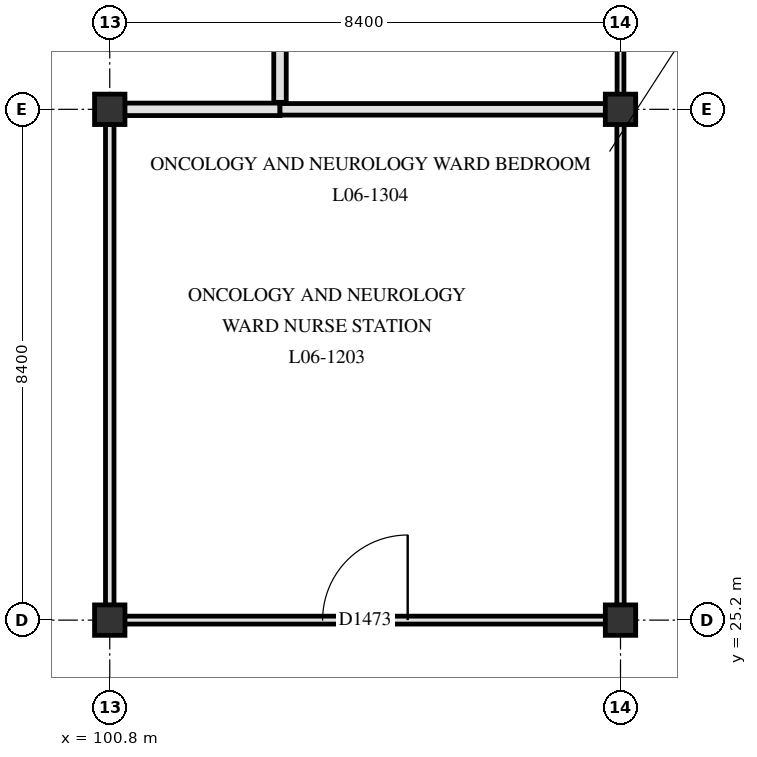
"""IFC4 building model, lengths in metres.
Left out: names, types, materials, properties, quantities, classifications, styles, units other than length and angle.
Written with IfcOpenShell. Run it as: python <this file> out.ifc"""

import sys

from ifc_helpers import new_model, si_unit, direction, frame, frame_2d, origin, origin_2d, place, context, subcontext, project, spatial, rectangle, extrude, element, fill, save


model = new_model("IFC4")
c1 = context("Model", 3, precision=1e-05, world=origin(), true_north=direction((0.0, 1.0)))
c2 = subcontext(c1, "Body", "Model", "MODEL_VIEW")
j1 = project(units=[si_unit("LENGTHUNIT", "METRE"), si_unit("PLANEANGLEUNIT", "RADIAN")], contexts=[c1])
p1 = place(None, origin())
s1 = spatial("IfcSite", under=j1, at=p1, CompositionType="ELEMENT")
p2 = place(p1, origin())
s2 = spatial("IfcBuilding", under=s1, at=p2, CompositionType="ELEMENT")
p3 = place(p2, frame((0.0, 0.0, 26.4)))
s3 = spatial("IfcBuildingStorey", under=s2, at=p3, CompositionType="ELEMENT", Elevation=26.4)
for number, where, z_axis, x_axis in (
    (1, (100.8, 25.2, 0.0), (0.0, 0.0, 1.0), (1.0, 0.0, 0.0)),
    (2, (100.8, 33.6, 0.0), (0.0, 0.0, 1.0), (1.0, 0.0, 0.0)),
    (3, (109.2, 25.2, 0.0), (0.0, 0.0, 1.0), (1.0, 0.0, 0.0)),
    (4, (109.2, 33.6, 0.0), (0.0, 0.0, 1.0), (1.0, 0.0, 0.0)),
):
    element("IfcColumn", number, at=place(p3, frame(where, z_axis=z_axis, x_axis=x_axis)), inside=s3, PredefinedType="COLUMN", context=c2, shape_type="SweptSolid", body=[
        extrude(rectangle(XDim=0.5, YDim=0.5, at=origin_2d()), origin(), (0.0, 0.0, 1.0), 3.9),
    ])
p4 = place(p3, frame((101.045, 25.2, 0.0), z_axis=(0.0, 0.0, 1.0), x_axis=(1.0, 0.0, 0.0)))
e5 = element("IfcWall", 5, at=p4, inside=s3, PredefinedType="PARTITIONING", context=c2, shape_type="SweptSolid", body=[
    extrude(rectangle(XDim=7.91, YDim=0.13, at=frame_2d((3.955, 0.0))), origin(), (0.0, 0.0, 1.0), 3.21),
])
p5 = place(p4, frame((3.255, 0.0, 0.0)))
e6 = element("IfcOpeningElement", 6, at=p5, cuts=e5, PredefinedType="OPENING", context=c2, shape_type="SweptSolid", body=[
    extrude(rectangle(XDim=1.4, YDim=2.2, at=frame_2d((0.7, 1.1))), frame((0.0, 0.075, 0.0), z_axis=(0.0, -1.0, 0.0), x_axis=(1.0, 0.0, 0.0)), (0.0, 0.0, 1.0), 0.15),
])
p6 = place(p3, frame((101.045, 33.6, 0.0), z_axis=(0.0, 0.0, 1.0), x_axis=(1.0, 0.0, 0.0)))
e7 = element("IfcWall", 7, at=p6, inside=s3, PredefinedType="PARTITIONING", context=c2, shape_type="SweptSolid", body=[
    extrude(rectangle(XDim=2.555, YDim=0.205, at=frame_2d((1.278, 0.0))), origin(), (0.0, 0.0, 1.0), 3.21),
])
p7 = place(p3, frame((103.6, 33.6, 0.0), z_axis=(0.0, 0.0, 1.0), x_axis=(1.0, 0.0, 0.0)))
e8 = element("IfcWall", 8, at=p7, inside=s3, PredefinedType="PARTITIONING", context=c2, shape_type="SweptSolid", body=[
    extrude(rectangle(XDim=5.355, YDim=0.19, at=frame_2d((2.677, 0.0))), origin(), (0.0, 0.0, 1.0), 3.21),
])
p8 = place(p3, frame((100.8, 25.445, 0.0), z_axis=(0.0, 0.0, 1.0), x_axis=(0.0, 1.0, 0.0)))
e9 = element("IfcWall", 9, at=p8, inside=s3, PredefinedType="PARTITIONING", context=c2, shape_type="SweptSolid", body=[
    extrude(rectangle(XDim=7.91, YDim=0.14, at=frame_2d((3.955, 0.0))), origin(), (0.0, 0.0, 1.0), 3.21),
])
p9 = place(p3, frame((103.6, 33.715, 0.0), z_axis=(0.0, 0.0, 1.0), x_axis=(0.0, 1.0, 0.0)))
e10 = element("IfcWall", 10, at=p9, inside=s3, PredefinedType="PARTITIONING", context=c2, shape_type="SweptSolid", body=[
    extrude(rectangle(XDim=3.97, YDim=0.205, at=frame_2d((1.985, 0.0))), origin(), (0.0, 0.0, 1.0), 3.34),
])
p10 = place(p9, frame((1.31, 0.0, 0.0)))
e11 = element("IfcOpeningElement", 11, at=p10, cuts=e10, PredefinedType="OPENING", context=c2, shape_type="SweptSolid", body=[
    extrude(rectangle(XDim=1.35, YDim=2.2, at=frame_2d((0.675, 1.1))), frame((0.0, 0.113, 0.0), z_axis=(0.0, -1.0, 0.0), x_axis=(1.0, 0.0, 0.0)), (0.0, 0.0, 1.0), 0.225),
])
p11 = place(p3, frame((109.2, 25.445, 0.0), z_axis=(0.0, 0.0, 1.0), x_axis=(0.0, 1.0, 0.0)))
e12 = element("IfcWall", 12, at=p11, inside=s3, PredefinedType="PARTITIONING", context=c2, shape_type="SweptSolid", body=[
    extrude(rectangle(XDim=7.91, YDim=0.12, at=frame_2d((3.955, 0.0))), origin(), (0.0, 0.0, 1.0), 3.21),
])
p12 = place(p3, frame((109.2, 33.845, 0.0), z_axis=(0.0, 0.0, 1.0), x_axis=(0.0, 1.0, 0.0)))
e13 = element("IfcWall", 13, at=p12, inside=s3, PredefinedType="PARTITIONING", context=c2, shape_type="SweptSolid", body=[
    extrude(rectangle(XDim=3.84, YDim=0.112, at=frame_2d((1.92, 0.0))), origin(), (0.0, 0.0, 1.0), 3.21),
])
p13 = place(p5, origin())
e14 = element("IfcDoor", 14, at=p13, inside=s3, OperationType="SINGLE_SWING_RIGHT", PredefinedType="DOOR", context=c2, shape_type="SweptSolid", body=[
    extrude(rectangle(XDim=1.4, YDim=2.2, at=frame_2d((0.7, 1.1))), frame((0.0, 0.025, 0.0), z_axis=(0.0, -1.0, 0.0), x_axis=(1.0, 0.0, 0.0)), (0.0, 0.0, 1.0), 0.05),
])
fill(e6, e14)
save(model, sys.argv[1])
